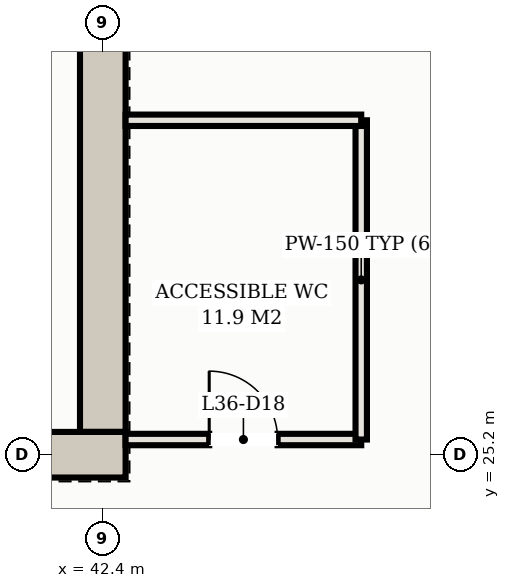
"""IFC4 building model, lengths in metres.
Left out: names, types, materials, properties, quantities, classifications, styles, units other than length and angle.
Written with IfcOpenShell. Run it as: python <this file> out.ifc"""

import sys

from ifc_helpers import new_model, si_unit, direction, frame, frame_2d, origin, place, context, subcontext, project, spatial, rectangle, extrude, element, fill, save


model = new_model("IFC4")
c1 = context("Model", 3, precision=1e-05, world=origin(), true_north=direction((0.0, 1.0)))
c2 = subcontext(c1, "Body", "Model", "MODEL_VIEW")
j1 = project(units=[si_unit("LENGTHUNIT", "METRE"), si_unit("PLANEANGLEUNIT", "RADIAN")], contexts=[c1])
p1 = place(None, origin())
s1 = spatial("IfcSite", under=j1, at=p1, CompositionType="ELEMENT")
p2 = place(p1, origin())
s2 = spatial("IfcBuilding", under=s1, at=p2, CompositionType="ELEMENT")
p3 = place(p2, frame((0.0, 0.0, 134.7)))
s3 = spatial("IfcBuildingStorey", under=s2, at=p3, CompositionType="ELEMENT", Elevation=134.7)
p4 = place(p3, frame((42.4, 25.5, 0.0), z_axis=(0.0, 0.0, 1.0), x_axis=(0.0, 1.0, 0.0)))
e1 = element("IfcWall", 1, at=p4, inside=s3, PredefinedType="SHEAR", context=c2, shape_type="SweptSolid", body=[
    extrude(rectangle(XDim=14.2, YDim=0.6, at=frame_2d((7.1, 0.0))), origin(), (0.0, 0.0, 1.0), 4.3),
])
p5 = place(p3, frame((34.6, 25.2, 0.0), z_axis=(0.0, 0.0, 1.0), x_axis=(1.0, 0.0, 0.0)))
e2 = element("IfcWall", 2, at=p5, inside=s3, PredefinedType="SHEAR", context=c2, shape_type="SweptSolid", body=[
    extrude(rectangle(XDim=8.1, YDim=0.6, at=frame_2d((4.05, 0.0))), origin(), (0.0, 0.0, 1.0), 4.3),
])
p6 = place(p5, frame((0.65, 0.0, 0.0)))
e3 = element("IfcOpeningElement", 3, at=p6, cuts=e2, PredefinedType="OPENING", context=c2, shape_type="SweptSolid", body=[
    extrude(rectangle(XDim=1.25, YDim=2.2, at=frame_2d((0.625, 1.1))), frame((0.0, 0.31, 0.0), z_axis=(0.0, -1.0, 0.0), x_axis=(1.0, 0.0, 0.0)), (0.0, 0.0, 1.0), 0.62),
])
p7 = place(p3, frame((42.7, 25.4, 0.0), z_axis=(0.0, 0.0, 1.0), x_axis=(1.0, 0.0, 0.0)))
e4 = element("IfcWall", 4, at=p7, inside=s3, PredefinedType="PARTITIONING", context=c2, shape_type="SweptSolid", body=[
    extrude(rectangle(XDim=3.1, YDim=0.15, at=frame_2d((1.55, 0.0))), origin(), (0.0, 0.0, 1.0), 3.595),
])
p8 = place(p7, frame((1.1, 0.0, 0.0)))
e5 = element("IfcOpeningElement", 5, at=p8, cuts=e4, PredefinedType="OPENING", context=c2, shape_type="SweptSolid", body=[
    extrude(rectangle(XDim=0.9, YDim=2.15, at=frame_2d((0.45, 1.075))), frame((0.0, 0.085, 0.0), z_axis=(0.0, -1.0, 0.0), x_axis=(1.0, 0.0, 0.0)), (0.0, 0.0, 1.0), 0.17),
])
p9 = place(p3, frame((45.8, 25.4, 0.0), z_axis=(0.0, 0.0, 1.0), x_axis=(0.0, 1.0, 0.0)))
e6 = element("IfcWall", 6, at=p9, inside=s3, PredefinedType="PARTITIONING", context=c2, shape_type="SweptSolid", body=[
    extrude(rectangle(XDim=4.2, YDim=0.15, at=frame_2d((2.1, 0.0))), origin(), (0.0, 0.0, 1.0), 4.3),
])
p10 = place(p3, frame((42.7, 29.6, 0.0), z_axis=(0.0, 0.0, 1.0), x_axis=(1.0, 0.0, 0.0)))
e7 = element("IfcWall", 7, at=p10, inside=s3, PredefinedType="PARTITIONING", context=c2, shape_type="SweptSolid", body=[
    extrude(rectangle(XDim=3.1, YDim=0.15, at=frame_2d((1.55, 0.0))), origin(), (0.0, 0.0, 1.0), 4.3),
])
p11 = place(p8, origin())
e8 = element("IfcDoor", 8, at=p11, inside=s3, OperationType="SINGLE_SWING_LEFT", PredefinedType="DOOR", context=c2, shape_type="SweptSolid", body=[
    extrude(rectangle(XDim=0.9, YDim=2.15, at=frame_2d((0.45, 1.075))), frame((0.0, 0.025, 0.0), z_axis=(0.0, -1.0, 0.0), x_axis=(1.0, 0.0, 0.0)), (0.0, 0.0, 1.0), 0.05),
])
fill(e5, e8)
save(model, sys.argv[1])
